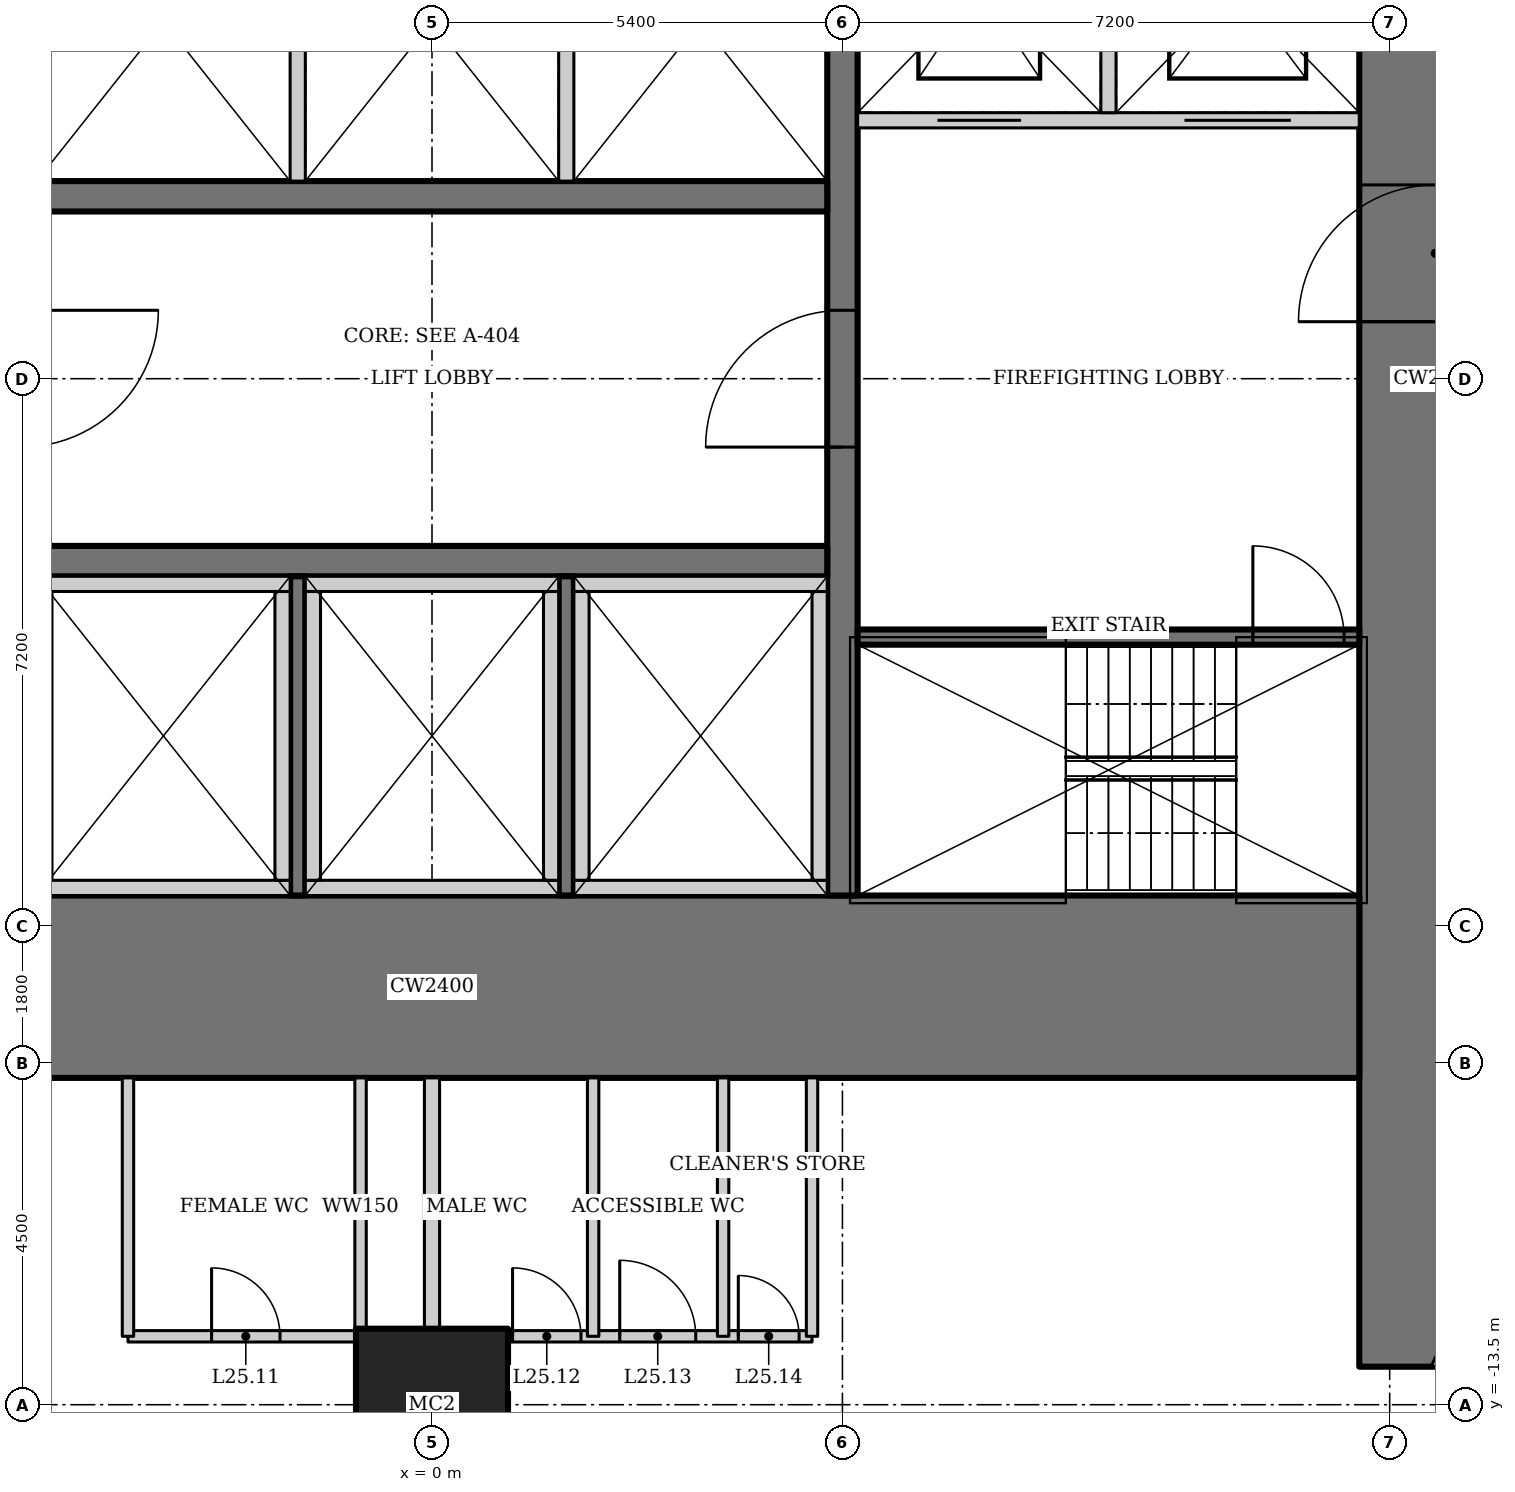
"""IFC4 building model, lengths in metres.
Left out: names, types, materials, properties, quantities, classifications, styles, units other than length and angle.
Written with IfcOpenShell. Run it as: python <this file> out.ifc"""

import sys

from ifc_helpers import new_model, si_unit, direction, frame, frame_2d, origin, origin_2d, place, context, subcontext, project, spatial, rectangle, hollow_rectangle, extrude, element, fill, save


model = new_model("IFC4")
c1 = context("Model", 3, precision=1e-05, world=origin(), true_north=direction((0.0, 1.0)))
c2 = subcontext(c1, "Body", "Model", "MODEL_VIEW")
j1 = project(units=[si_unit("LENGTHUNIT", "METRE"), si_unit("PLANEANGLEUNIT", "RADIAN")], contexts=[c1])
p1 = place(None, origin())
s1 = spatial("IfcSite", under=j1, at=p1, CompositionType="ELEMENT")
p2 = place(p1, origin())
s2 = spatial("IfcBuilding", under=s1, at=p2, CompositionType="ELEMENT")
p3 = place(p2, frame((0.0, 0.0, 105.4)))
s3 = spatial("IfcBuildingStorey", under=s2, at=p3, CompositionType="ELEMENT", Elevation=105.4)
p4 = place(p3, frame((0.0, -13.5, 0.0), z_axis=(0.0, 0.0, 1.0), x_axis=(1.0, 0.0, 0.0)))
e1 = element("IfcColumn", 1, at=p4, inside=s3, PredefinedType="COLUMN", context=c2, shape_type="SweptSolid", body=[
    extrude(hollow_rectangle(XDim=2.0, YDim=2.0, WallThickness=0.17, at=origin_2d()), origin(), (0.0, 0.0, 1.0), 6.0),
])
p5 = place(p3, frame((13.2, -13.0, 0.0), z_axis=(0.0, 0.0, 1.0), x_axis=(0.0, 1.0, 0.0)))
e2 = element("IfcWall", 2, at=p5, inside=s3, PredefinedType="SHEAR", context=c2, shape_type="SweptSolid", body=[
    extrude(rectangle(XDim=26.0, YDim=2.0, at=frame_2d((13.0, 0.0))), origin(), (0.0, 0.0, 1.0), 6.0),
])
p6 = place(p5, frame((13.75, 0.0, 0.0)))
e3 = element("IfcOpeningElement", 3, at=p6, cuts=e2, PredefinedType="OPENING", context=c2, shape_type="SweptSolid", body=[
    extrude(rectangle(XDim=1.8, YDim=2.1, at=frame_2d((0.9, 1.05))), frame((0.0, 1.01, 0.0), z_axis=(0.0, -1.0, 0.0), x_axis=(1.0, 0.0, 0.0)), (0.0, 0.0, 1.0), 2.02),
])
p7 = place(p3, frame((-12.2, -8.0, 0.0), z_axis=(0.0, 0.0, 1.0), x_axis=(1.0, 0.0, 0.0)))
e4 = element("IfcWall", 4, at=p7, inside=s3, PredefinedType="SHEAR", context=c2, shape_type="SweptSolid", body=[
    extrude(rectangle(XDim=24.4, YDim=2.4, at=frame_2d((12.2, 0.0))), origin(), (0.0, 0.0, 1.0), 6.0),
])
p8 = place(p3, frame((5.4, -6.8, 0.0), z_axis=(0.0, 0.0, 1.0), x_axis=(0.0, 1.0, 0.0)))
e5 = element("IfcWall", 5, at=p8, inside=s3, PredefinedType="SHEAR", context=c2, shape_type="SweptSolid", body=[
    extrude(rectangle(XDim=13.6, YDim=0.4, at=frame_2d((6.8, 0.0))), origin(), (0.0, 0.0, 1.0), 6.0),
])
p9 = place(p8, frame((5.9, 0.0, 0.0)))
e6 = element("IfcOpeningElement", 6, at=p9, cuts=e5, PredefinedType="OPENING", context=c2, shape_type="SweptSolid", body=[
    extrude(rectangle(XDim=1.8, YDim=2.1, at=frame_2d((0.9, 1.05))), frame((0.0, 0.21, 0.0), z_axis=(0.0, -1.0, 0.0), x_axis=(1.0, 0.0, 0.0)), (0.0, 0.0, 1.0), 0.42),
])
p10 = place(p3, frame((-5.2, -2.4, 0.0), z_axis=(0.0, 0.0, 1.0), x_axis=(1.0, 0.0, 0.0)))
e7 = element("IfcWall", 7, at=p10, inside=s3, PredefinedType="SHEAR", context=c2, shape_type="SweptSolid", body=[
    extrude(rectangle(XDim=10.4, YDim=0.4, at=frame_2d((5.2, 0.0))), origin(), (0.0, 0.0, 1.0), 6.0),
])
for number, where, z_axis, x_axis in (
    (8, (-1.767, -2.6, 0.0), (0.0, 0.0, 1.0), (0.0, -1.0, 0.0)),
    (9, (1.767, -2.6, 0.0), (0.0, 0.0, 1.0), (0.0, -1.0, 0.0)),
):
    element("IfcWall", number, at=place(p3, frame(where, z_axis=z_axis, x_axis=x_axis)), inside=s3, PredefinedType="SOLIDWALL", context=c2, shape_type="SweptSolid", body=[
        extrude(rectangle(XDim=4.2, YDim=0.2, at=frame_2d((2.1, 0.0))), origin(), (0.0, 0.0, 1.0), 6.0),
    ])
p11 = place(p3, frame((5.2, 2.4, 0.0), z_axis=(0.0, 0.0, 1.0), x_axis=(-1.0, 0.0, 0.0)))
e10 = element("IfcWall", 10, at=p11, inside=s3, PredefinedType="SHEAR", context=c2, shape_type="SweptSolid", body=[
    extrude(rectangle(XDim=10.4, YDim=0.4, at=frame_2d((5.2, 0.0))), origin(), (0.0, 0.0, 1.0), 6.0),
])
for number, where, z_axis, x_axis in (
    (11, (-1.767, 2.6, 0.0), (0.0, 0.0, 1.0), (0.0, 1.0, 0.0)),
    (12, (1.767, 2.6, 0.0), (0.0, 0.0, 1.0), (0.0, 1.0, 0.0)),
):
    element("IfcWall", number, at=place(p3, frame(where, z_axis=z_axis, x_axis=x_axis)), inside=s3, PredefinedType="SOLIDWALL", context=c2, shape_type="SweptSolid", body=[
        extrude(rectangle(XDim=4.2, YDim=0.2, at=frame_2d((2.1, 0.0))), origin(), (0.0, 0.0, 1.0), 6.0),
    ])
p12 = place(p3, frame((5.6, -3.4, 0.0), z_axis=(0.0, 0.0, 1.0), x_axis=(1.0, 0.0, 0.0)))
e13 = element("IfcWall", 13, at=p12, inside=s3, PredefinedType="SHEAR", context=c2, shape_type="SweptSolid", body=[
    extrude(rectangle(XDim=6.6, YDim=0.2, at=frame_2d((3.3, 0.0))), origin(), (0.0, 0.0, 1.0), 6.0),
])
p13 = place(p12, frame((5.2, 0.0, 0.0)))
e14 = element("IfcOpeningElement", 14, at=p13, cuts=e13, PredefinedType="OPENING", context=c2, shape_type="SweptSolid", body=[
    extrude(rectangle(XDim=1.2, YDim=2.1, at=frame_2d((0.6, 1.05))), frame((0.0, 0.11, 0.0), z_axis=(0.0, -1.0, 0.0), x_axis=(1.0, 0.0, 0.0)), (0.0, 0.0, 1.0), 0.22),
])
p14 = place(p3, frame((12.2, 3.4, 0.0), z_axis=(0.0, 0.0, 1.0), x_axis=(-1.0, 0.0, 0.0)))
e15 = element("IfcWall", 15, at=p14, inside=s3, PredefinedType="SOLIDWALL", context=c2, shape_type="SweptSolid", body=[
    extrude(rectangle(XDim=6.6, YDim=0.2, at=frame_2d((3.3, 0.0))), origin(), (0.0, 0.0, 1.0), 6.0),
])
p15 = place(p14, frame((4.45, 0.0, 0.0)))
e16 = element("IfcOpeningElement", 16, at=p15, cuts=e15, PredefinedType="OPENING", context=c2, shape_type="SweptSolid", body=[
    extrude(rectangle(XDim=1.1, YDim=2.2, at=frame_2d((0.55, 1.1))), frame((0.0, 0.11, 0.0), z_axis=(0.0, -1.0, 0.0), x_axis=(1.0, 0.0, 0.0)), (0.0, 0.0, 1.0), 0.22),
])
p16 = place(p14, frame((0.9, 0.0, 0.0)))
e17 = element("IfcOpeningElement", 17, at=p16, cuts=e15, PredefinedType="OPENING", context=c2, shape_type="SweptSolid", body=[
    extrude(rectangle(XDim=1.4, YDim=2.2, at=frame_2d((0.7, 1.1))), frame((0.0, 0.11, 0.0), z_axis=(0.0, -1.0, 0.0), x_axis=(1.0, 0.0, 0.0)), (0.0, 0.0, 1.0), 0.22),
])
p17 = place(p3, frame((8.9, 3.5, 0.0), z_axis=(0.0, 0.0, 1.0), x_axis=(0.0, 1.0, 0.0)))
e18 = element("IfcWall", 18, at=p17, inside=s3, PredefinedType="SOLIDWALL", context=c2, shape_type="SweptSolid", body=[
    extrude(rectangle(XDim=3.3, YDim=0.2, at=frame_2d((1.65, 0.0))), origin(), (0.0, 0.0, 1.0), 6.0),
])
p18 = place(p3, frame((-4.0, -12.6, 0.0), z_axis=(0.0, 0.0, 1.0), x_axis=(1.0, 0.0, 0.0)))
e19 = element("IfcWall", 19, at=p18, inside=s3, PredefinedType="SOLIDWALL", context=c2, shape_type="SweptSolid", body=[
    extrude(rectangle(XDim=9.0, YDim=0.15, at=frame_2d((4.5, 0.0))), origin(), (0.0, 0.0, 1.0), 5.8),
])
p19 = place(p18, frame((1.1, 0.0, 0.0)))
e20 = element("IfcOpeningElement", 20, at=p19, cuts=e19, PredefinedType="OPENING", context=c2, shape_type="SweptSolid", body=[
    extrude(rectangle(XDim=0.9, YDim=2.1, at=frame_2d((0.45, 1.05))), frame((0.0, 0.085, 0.0), z_axis=(0.0, -1.0, 0.0), x_axis=(1.0, 0.0, 0.0)), (0.0, 0.0, 1.0), 0.17),
])
p20 = place(p18, frame((5.06, 0.0, 0.0)))
e21 = element("IfcOpeningElement", 21, at=p20, cuts=e19, PredefinedType="OPENING", context=c2, shape_type="SweptSolid", body=[
    extrude(rectangle(XDim=0.9, YDim=2.1, at=frame_2d((0.45, 1.05))), frame((0.0, 0.085, 0.0), z_axis=(0.0, -1.0, 0.0), x_axis=(1.0, 0.0, 0.0)), (0.0, 0.0, 1.0), 0.17),
])
p21 = place(p18, frame((6.47, 0.0, 0.0)))
e22 = element("IfcOpeningElement", 22, at=p21, cuts=e19, PredefinedType="OPENING", context=c2, shape_type="SweptSolid", body=[
    extrude(rectangle(XDim=1.0, YDim=2.1, at=frame_2d((0.5, 1.05))), frame((0.0, 0.085, 0.0), z_axis=(0.0, -1.0, 0.0), x_axis=(1.0, 0.0, 0.0)), (0.0, 0.0, 1.0), 0.17),
])
p22 = place(p18, frame((8.03, 0.0, 0.0)))
e23 = element("IfcOpeningElement", 23, at=p22, cuts=e19, PredefinedType="OPENING", context=c2, shape_type="SweptSolid", body=[
    extrude(rectangle(XDim=0.8, YDim=2.1, at=frame_2d((0.4, 1.05))), frame((0.0, 0.085, 0.0), z_axis=(0.0, -1.0, 0.0), x_axis=(1.0, 0.0, 0.0)), (0.0, 0.0, 1.0), 0.17),
])
for number, where, z_axis, x_axis in (
    (24, (-4.0, -9.2, 0.0), (0.0, 0.0, 1.0), (0.0, -1.0, 0.0)),
    (25, (5.0, -9.2, 0.0), (0.0, 0.0, 1.0), (0.0, -1.0, 0.0)),
    (26, (-0.94, -9.2, 0.0), (0.0, 0.0, 1.0), (0.0, -1.0, 0.0)),
):
    element("IfcWall", number, at=place(p3, frame(where, z_axis=z_axis, x_axis=x_axis)), inside=s3, PredefinedType="SOLIDWALL", context=c2, shape_type="SweptSolid", body=[
        extrude(rectangle(XDim=3.4, YDim=0.15, at=frame_2d((1.7, 0.0))), origin(), (0.0, 0.0, 1.0), 5.8),
    ])
p23 = place(p3, frame((2.12, -9.2, 0.0), z_axis=(0.0, 0.0, 1.0), x_axis=(0.0, -1.0, 0.0)))
e27 = element("IfcWall", 27, at=p23, inside=s3, PredefinedType="SOLIDWALL", context=c2, shape_type="SweptSolid", body=[
    extrude(rectangle(XDim=3.4, YDim=0.15, at=frame_2d((1.7, 0.0))), origin(), (0.0, 0.0, 1.0), 4.954),
])
p24 = place(p3, frame((3.83, -9.2, 0.0), z_axis=(0.0, 0.0, 1.0), x_axis=(0.0, -1.0, 0.0)))
e28 = element("IfcWall", 28, at=p24, inside=s3, PredefinedType="SOLIDWALL", context=c2, shape_type="SweptSolid", body=[
    extrude(rectangle(XDim=3.4, YDim=0.15, at=frame_2d((1.7, 0.0))), origin(), (0.0, 0.0, 1.0), 5.8),
])
p25 = place(p3, frame((0.0, -9.2, 0.0), z_axis=(0.0, 0.0, 1.0), x_axis=(0.0, -1.0, 0.0)))
e29 = element("IfcWall", 29, at=p25, inside=s3, PredefinedType="SOLIDWALL", context=c2, shape_type="SweptSolid", body=[
    extrude(rectangle(XDim=13.745, YDim=0.2, at=frame_2d((6.873, 0.0))), origin(), (0.0, 0.0, 1.0), 4.6),
])
p26 = place(p3, frame((13.2, -13.0, 0.0), z_axis=(0.0, 0.0, 1.0), x_axis=(0.420129824888, 0.907464010437, 0.0)))
e30 = element("IfcWall", 30, at=p26, inside=s3, PredefinedType="PARTITIONING", context=c2, shape_type="SweptSolid", body=[
    extrude(rectangle(XDim=2.975, YDim=0.1, at=frame_2d((1.488, 0.0))), origin(), (0.0, 0.0, 1.0), 5.8),
])
p27 = place(p3, frame((-5.2, -6.7, 2.55), z_axis=(0.0, 0.0, 1.0), x_axis=(1.0, 0.0, 0.0)))
e31 = element("IfcWall", 31, at=p27, inside=s3, PredefinedType="SOLIDWALL", context=c2, shape_type="SweptSolid", body=[
    extrude(rectangle(XDim=3.333, YDim=0.2, at=frame_2d((1.667, 0.0))), origin(), (0.0, 0.0, 1.0), 3.25),
])
p28 = place(p3, frame((-1.967, -6.6, 2.55), z_axis=(0.0, 0.0, 1.0), x_axis=(0.0, 1.0, 0.0)))
e32 = element("IfcWall", 32, at=p28, inside=s3, PredefinedType="SOLIDWALL", context=c2, shape_type="SweptSolid", body=[
    extrude(rectangle(XDim=3.8, YDim=0.2, at=frame_2d((1.9, 0.0))), origin(), (0.0, 0.0, 1.0), 3.25),
])
p29 = place(p3, frame((-1.867, -2.7, 2.55), z_axis=(0.0, 0.0, 1.0), x_axis=(-1.0, 0.0, 0.0)))
e33 = element("IfcWall", 33, at=p29, inside=s3, PredefinedType="SOLIDWALL", context=c2, shape_type="SweptSolid", body=[
    extrude(rectangle(XDim=3.333, YDim=0.2, at=frame_2d((1.667, 0.0))), origin(), (0.0, 0.0, 1.0), 3.25),
])
p30 = place(p3, frame((-1.667, -6.7, 2.55), z_axis=(0.0, 0.0, 1.0), x_axis=(1.0, 0.0, 0.0)))
e34 = element("IfcWall", 34, at=p30, inside=s3, PredefinedType="SOLIDWALL", context=c2, shape_type="SweptSolid", body=[
    extrude(rectangle(XDim=3.333, YDim=0.2, at=frame_2d((1.667, 0.0))), origin(), (0.0, 0.0, 1.0), 3.25),
])
p31 = place(p3, frame((1.567, -6.6, 2.55), z_axis=(0.0, 0.0, 1.0), x_axis=(0.0, 1.0, 0.0)))
e35 = element("IfcWall", 35, at=p31, inside=s3, PredefinedType="SOLIDWALL", context=c2, shape_type="SweptSolid", body=[
    extrude(rectangle(XDim=3.8, YDim=0.2, at=frame_2d((1.9, 0.0))), origin(), (0.0, 0.0, 1.0), 3.25),
])
p32 = place(p3, frame((1.667, -2.7, 2.55), z_axis=(0.0, 0.0, 1.0), x_axis=(-1.0, 0.0, 0.0)))
e36 = element("IfcWall", 36, at=p32, inside=s3, PredefinedType="SOLIDWALL", context=c2, shape_type="SweptSolid", body=[
    extrude(rectangle(XDim=3.333, YDim=0.2, at=frame_2d((1.667, 0.0))), origin(), (0.0, 0.0, 1.0), 3.25),
])
p33 = place(p3, frame((-1.567, -2.8, 2.55), z_axis=(0.0, 0.0, 1.0), x_axis=(0.0, -1.0, 0.0)))
e37 = element("IfcWall", 37, at=p33, inside=s3, PredefinedType="SOLIDWALL", context=c2, shape_type="SweptSolid", body=[
    extrude(rectangle(XDim=3.8, YDim=0.2, at=frame_2d((1.9, 0.0))), origin(), (0.0, 0.0, 1.0), 3.25),
])
p34 = place(p3, frame((1.867, -6.7, 2.55), z_axis=(0.0, 0.0, 1.0), x_axis=(1.0, 0.0, 0.0)))
e38 = element("IfcWall", 38, at=p34, inside=s3, PredefinedType="SOLIDWALL", context=c2, shape_type="SweptSolid", body=[
    extrude(rectangle(XDim=3.333, YDim=0.2, at=frame_2d((1.667, 0.0))), origin(), (0.0, 0.0, 1.0), 3.25),
])
p35 = place(p3, frame((5.1, -6.6, 2.55), z_axis=(0.0, 0.0, 1.0), x_axis=(0.0, 1.0, 0.0)))
e39 = element("IfcWall", 39, at=p35, inside=s3, PredefinedType="SOLIDWALL", context=c2, shape_type="SweptSolid", body=[
    extrude(rectangle(XDim=3.8, YDim=0.2, at=frame_2d((1.9, 0.0))), origin(), (0.0, 0.0, 1.0), 3.25),
])
p36 = place(p3, frame((5.2, -2.7, 2.55), z_axis=(0.0, 0.0, 1.0), x_axis=(-1.0, 0.0, 0.0)))
e40 = element("IfcWall", 40, at=p36, inside=s3, PredefinedType="SOLIDWALL", context=c2, shape_type="SweptSolid", body=[
    extrude(rectangle(XDim=3.333, YDim=0.2, at=frame_2d((1.667, 0.0))), origin(), (0.0, 0.0, 1.0), 3.25),
])
p37 = place(p3, frame((1.967, -2.8, 2.55), z_axis=(0.0, 0.0, 1.0), x_axis=(0.0, -1.0, 0.0)))
e41 = element("IfcWall", 41, at=p37, inside=s3, PredefinedType="SOLIDWALL", context=c2, shape_type="SweptSolid", body=[
    extrude(rectangle(XDim=3.8, YDim=0.2, at=frame_2d((1.9, 0.0))), origin(), (0.0, 0.0, 1.0), 3.25),
])
p38 = place(p9, origin())
e42 = element("IfcDoor", 42, at=p38, inside=s3, OperationType="DOUBLE_DOOR_DOUBLE_SWING", PredefinedType="DOOR", context=c2, shape_type="SweptSolid", body=[
    extrude(rectangle(XDim=1.8, YDim=2.1, at=frame_2d((0.9, 1.05))), frame((0.0, 0.025, 0.0), z_axis=(0.0, -1.0, 0.0), x_axis=(1.0, 0.0, 0.0)), (0.0, 0.0, 1.0), 0.05),
])
fill(e6, e42)
p39 = place(p13, origin())
e43 = element("IfcDoor", 43, at=p39, inside=s3, OperationType="SINGLE_SWING_RIGHT", PredefinedType="DOOR", context=c2, shape_type="SweptSolid", body=[
    extrude(rectangle(XDim=1.2, YDim=2.1, at=frame_2d((0.6, 1.05))), frame((0.0, 0.025, 0.0), z_axis=(0.0, -1.0, 0.0), x_axis=(1.0, 0.0, 0.0)), (0.0, 0.0, 1.0), 0.05),
])
fill(e14, e43)
p40 = place(p6, origin())
e44 = element("IfcDoor", 44, at=p40, inside=s3, OperationType="DOUBLE_DOOR_DOUBLE_SWING", PredefinedType="DOOR", context=c2, shape_type="SweptSolid", body=[
    extrude(rectangle(XDim=1.8, YDim=2.1, at=frame_2d((0.9, 1.05))), frame((0.0, 0.025, 0.0), z_axis=(0.0, -1.0, 0.0), x_axis=(1.0, 0.0, 0.0)), (0.0, 0.0, 1.0), 0.05),
])
fill(e3, e44)
p41 = place(p15, origin())
e45 = element("IfcDoor", 45, at=p41, inside=s3, OperationType="DOUBLE_DOOR_SLIDING", PredefinedType="DOOR", context=c2, shape_type="SweptSolid", body=[
    extrude(rectangle(XDim=1.1, YDim=2.2, at=frame_2d((0.55, 1.1))), frame((0.0, 0.025, 0.0), z_axis=(0.0, -1.0, 0.0), x_axis=(1.0, 0.0, 0.0)), (0.0, 0.0, 1.0), 0.05),
])
fill(e16, e45)
p42 = place(p16, origin())
e46 = element("IfcDoor", 46, at=p42, inside=s3, OperationType="DOUBLE_DOOR_SLIDING", PredefinedType="DOOR", context=c2, shape_type="SweptSolid", body=[
    extrude(rectangle(XDim=1.4, YDim=2.2, at=frame_2d((0.7, 1.1))), frame((0.0, 0.025, 0.0), z_axis=(0.0, -1.0, 0.0), x_axis=(1.0, 0.0, 0.0)), (0.0, 0.0, 1.0), 0.05),
])
fill(e17, e46)
p43 = place(p19, origin())
e47 = element("IfcDoor", 47, at=p43, inside=s3, OperationType="SINGLE_SWING_LEFT", PredefinedType="DOOR", context=c2, shape_type="SweptSolid", body=[
    extrude(rectangle(XDim=0.9, YDim=2.1, at=frame_2d((0.45, 1.05))), frame((0.0, 0.025, 0.0), z_axis=(0.0, -1.0, 0.0), x_axis=(1.0, 0.0, 0.0)), (0.0, 0.0, 1.0), 0.05),
])
fill(e20, e47)
p44 = place(p20, origin())
e48 = element("IfcDoor", 48, at=p44, inside=s3, OperationType="SINGLE_SWING_LEFT", PredefinedType="DOOR", context=c2, shape_type="SweptSolid", body=[
    extrude(rectangle(XDim=0.9, YDim=2.1, at=frame_2d((0.45, 1.05))), frame((0.0, 0.025, 0.0), z_axis=(0.0, -1.0, 0.0), x_axis=(1.0, 0.0, 0.0)), (0.0, 0.0, 1.0), 0.05),
])
fill(e21, e48)
p45 = place(p21, origin())
e49 = element("IfcDoor", 49, at=p45, inside=s3, OperationType="SINGLE_SWING_LEFT", PredefinedType="DOOR", context=c2, shape_type="SweptSolid", body=[
    extrude(rectangle(XDim=1.0, YDim=2.1, at=frame_2d((0.5, 1.05))), frame((0.0, 0.025, 0.0), z_axis=(0.0, -1.0, 0.0), x_axis=(1.0, 0.0, 0.0)), (0.0, 0.0, 1.0), 0.05),
])
fill(e22, e49)
p46 = place(p22, origin())
e50 = element("IfcDoor", 50, at=p46, inside=s3, OperationType="SINGLE_SWING_LEFT", PredefinedType="DOOR", context=c2, shape_type="SweptSolid", body=[
    extrude(rectangle(XDim=0.8, YDim=2.1, at=frame_2d((0.4, 1.05))), frame((0.0, 0.025, 0.0), z_axis=(0.0, -1.0, 0.0), x_axis=(1.0, 0.0, 0.0)), (0.0, 0.0, 1.0), 0.05),
])
fill(e23, e50)
save(model, sys.argv[1])
